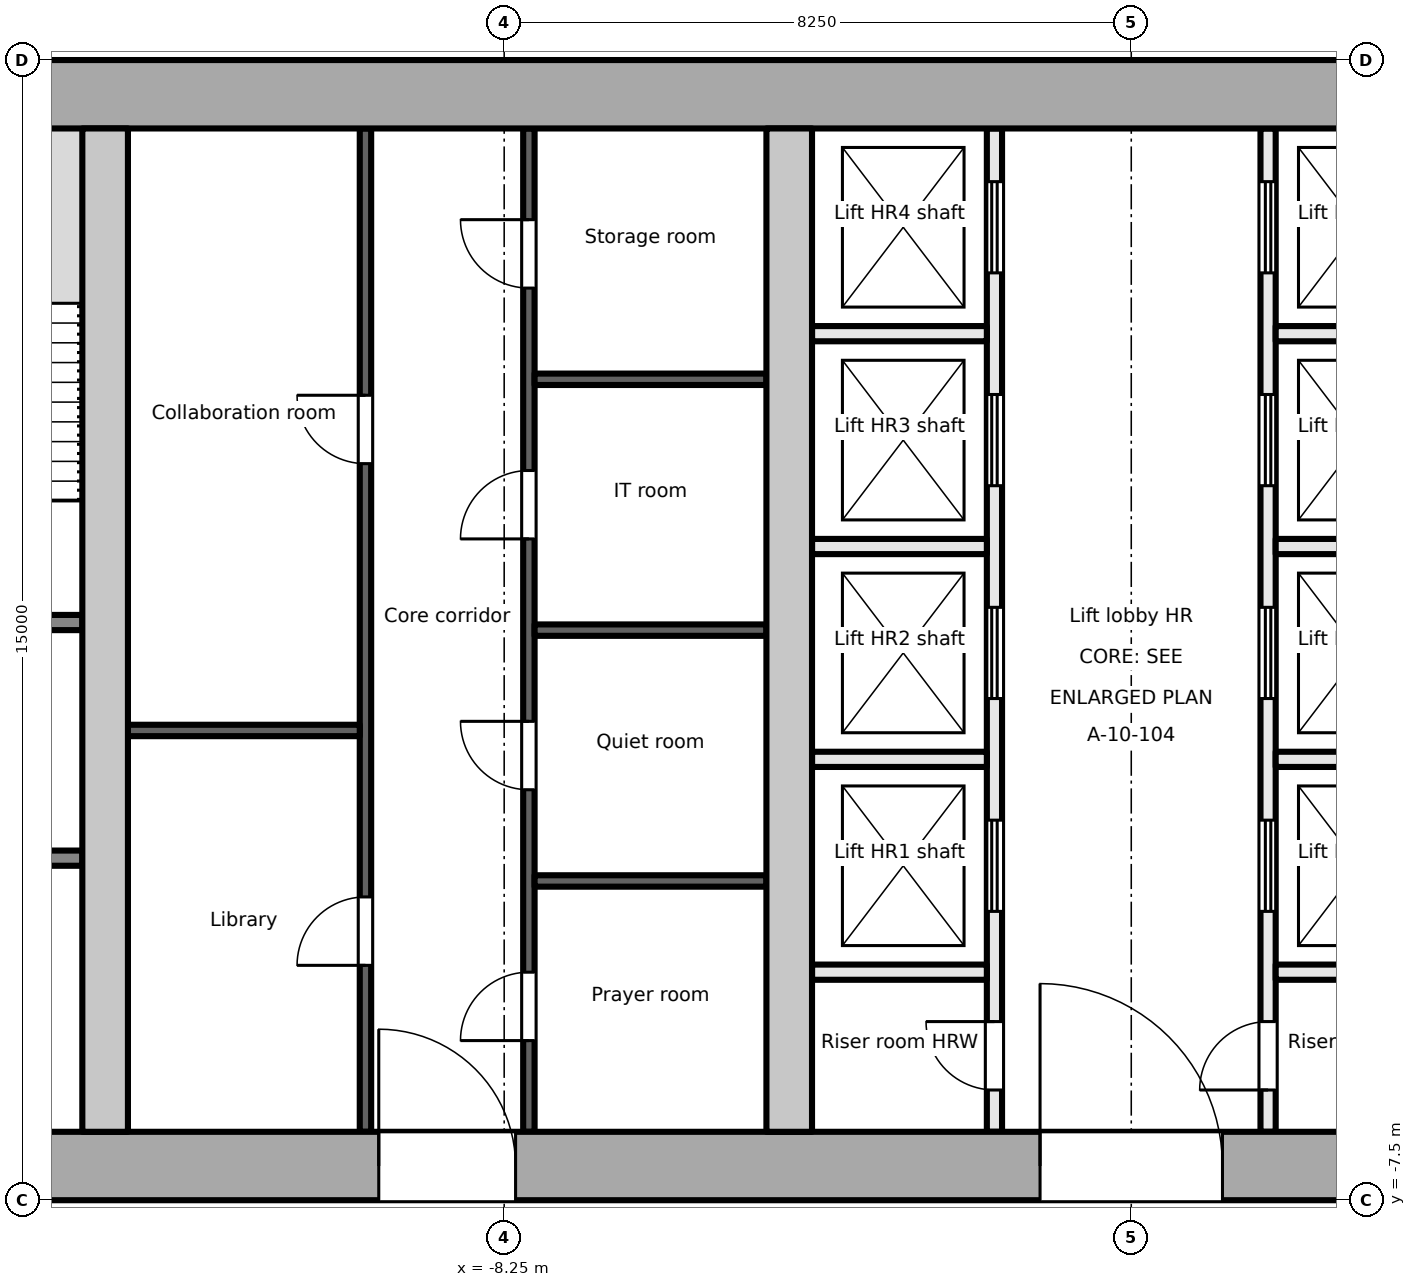
"""IFC4 building model, lengths in metres.
Left out: names, types, materials, properties, quantities, classifications, styles, units other than length and angle.
Written with IfcOpenShell. Run it as: python <this file> out.ifc"""

import sys

from ifc_helpers import new_model, si_unit, direction, frame, frame_2d, origin, place, context, subcontext, project, spatial, rectangle, extrude, element, fill, save


model = new_model("IFC4")
c1 = context("Model", 3, precision=1e-05, world=origin(), true_north=direction((0.0, 1.0)))
c2 = subcontext(c1, "Body", "Model", "MODEL_VIEW")
j1 = project(units=[si_unit("LENGTHUNIT", "METRE"), si_unit("PLANEANGLEUNIT", "RADIAN")], contexts=[c1])
p1 = place(None, origin())
s1 = spatial("IfcSite", under=j1, at=p1, CompositionType="ELEMENT")
p2 = place(p1, origin())
s2 = spatial("IfcBuilding", under=s1, at=p2, CompositionType="ELEMENT")
p3 = place(p2, frame((0.0, 0.0, 195.8)))
s3 = spatial("IfcBuildingStorey", under=s2, at=p3, CompositionType="ELEMENT", Elevation=195.8)
p4 = place(p3, frame((-18.0, -7.05, -0.2), z_axis=(0.0, 0.0, 1.0), x_axis=(1.0, 0.0, 0.0)))
e1 = element("IfcWall", 1, at=p4, inside=s3, PredefinedType="SHEAR", context=c2, shape_type="SweptSolid", body=[
    extrude(rectangle(XDim=36.0, YDim=0.9, at=frame_2d((18.0, 0.0))), origin(), (0.0, 0.0, 1.0), 3.9),
])
p5 = place(p4, frame((8.1, 0.0, 0.2)))
e2 = element("IfcOpeningElement", 2, at=p5, cuts=e1, PredefinedType="OPENING", context=c2, shape_type="SweptSolid", body=[
    extrude(rectangle(XDim=1.8, YDim=2.1, at=frame_2d((0.9, 1.05))), frame((0.0, 0.46, 0.0), z_axis=(0.0, -1.0, 0.0), x_axis=(1.0, 0.0, 0.0)), (0.0, 0.0, 1.0), 0.921),
])
p6 = place(p4, frame((16.8, 0.0, 0.2)))
e3 = element("IfcOpeningElement", 3, at=p6, cuts=e1, PredefinedType="OPENING", context=c2, shape_type="SweptSolid", body=[
    extrude(rectangle(XDim=2.4, YDim=2.1, at=frame_2d((1.2, 1.05))), frame((0.0, 0.46, 0.0), z_axis=(0.0, -1.0, 0.0), x_axis=(1.0, 0.0, 0.0)), (0.0, 0.0, 1.0), 0.921),
])
p7 = place(p4, frame((26.1, 0.0, 0.2)))
e4 = element("IfcOpeningElement", 4, at=p7, cuts=e1, PredefinedType="OPENING", context=c2, shape_type="SweptSolid", body=[
    extrude(rectangle(XDim=2.4, YDim=2.1, at=frame_2d((1.2, 1.05))), frame((0.0, 0.46, 0.0), z_axis=(0.0, -1.0, 0.0), x_axis=(1.0, 0.0, 0.0)), (0.0, 0.0, 1.0), 0.921),
])
p8 = place(p3, frame((-18.0, 7.05, -0.2), z_axis=(0.0, 0.0, 1.0), x_axis=(1.0, 0.0, 0.0)))
e5 = element("IfcWall", 5, at=p8, inside=s3, PredefinedType="SHEAR", context=c2, shape_type="SweptSolid", body=[
    extrude(rectangle(XDim=36.0, YDim=0.9, at=frame_2d((18.0, 0.0))), origin(), (0.0, 0.0, 1.0), 3.9),
])
for number, where, z_axis, x_axis in (
    (6, (-13.5, -6.6, -0.2), (0.0, 0.0, 1.0), (0.0, 1.0, 0.0)),
    (7, (-4.5, -6.6, -0.2), (0.0, 0.0, 1.0), (0.0, 1.0, 0.0)),
):
    element("IfcWall", number, at=place(p3, frame(where, z_axis=z_axis, x_axis=x_axis)), inside=s3, PredefinedType="SHEAR", context=c2, shape_type="SweptSolid", body=[
        extrude(rectangle(XDim=13.2, YDim=0.6, at=frame_2d((6.6, 0.0))), origin(), (0.0, 0.0, 1.0), 3.9),
    ])
p9 = place(p3, frame((-17.1, -3.0, 0.0), z_axis=(0.0, 0.0, 1.0), x_axis=(1.0, 0.0, 0.0)))
e8 = element("IfcWall", 8, at=p9, inside=s3, PredefinedType="PARTITIONING", context=c2, shape_type="SweptSolid", body=[
    extrude(rectangle(XDim=3.3, YDim=0.2, at=frame_2d((1.65, 0.0))), origin(), (0.0, 0.0, 1.0), 3.7),
])
p10 = place(p9, frame((1.1, 0.0, 0.0)))
e9 = element("IfcOpeningElement", 9, at=p10, cuts=e8, PredefinedType="OPENING", context=c2, shape_type="SweptSolid", body=[
    extrude(rectangle(XDim=1.1, YDim=2.1, at=frame_2d((0.55, 1.05))), frame((0.0, 0.111, 0.0), z_axis=(0.0, -1.0, 0.0), x_axis=(1.0, 0.0, 0.0)), (0.0, 0.0, 1.0), 0.221),
])
p11 = place(p3, frame((-17.1, 0.1, 0.0), z_axis=(0.0, 0.0, 1.0), x_axis=(1.0, 0.0, 0.0)))
e10 = element("IfcWall", 10, at=p11, inside=s3, PredefinedType="PARTITIONING", context=c2, shape_type="SweptSolid", body=[
    extrude(rectangle(XDim=3.3, YDim=0.2, at=frame_2d((1.65, 0.0))), origin(), (0.0, 0.0, 1.0), 3.7),
])
p12 = place(p11, frame((1.1, 0.0, 0.0)))
e11 = element("IfcOpeningElement", 11, at=p12, cuts=e10, PredefinedType="OPENING", context=c2, shape_type="SweptSolid", body=[
    extrude(rectangle(XDim=1.1, YDim=2.1, at=frame_2d((0.55, 1.05))), frame((0.0, 0.111, 0.0), z_axis=(0.0, -1.0, 0.0), x_axis=(1.0, 0.0, 0.0)), (0.0, 0.0, 1.0), 0.221),
])
p13 = place(p3, frame((-10.075, -6.6, 0.0), z_axis=(0.0, 0.0, 1.0), x_axis=(0.0, 1.0, 0.0)))
e12 = element("IfcWall", 12, at=p13, inside=s3, PredefinedType="PARTITIONING", context=c2, shape_type="SweptSolid", body=[
    extrude(rectangle(XDim=13.2, YDim=0.15, at=frame_2d((6.6, 0.0))), origin(), (0.0, 0.0, 1.0), 3.7),
])
p14 = place(p13, frame((2.19, 0.0, 0.0)))
e13 = element("IfcOpeningElement", 13, at=p14, cuts=e12, PredefinedType="OPENING", context=c2, shape_type="SweptSolid", body=[
    extrude(rectangle(XDim=0.9, YDim=2.1, at=frame_2d((0.45, 1.05))), frame((0.0, 0.085, 0.0), z_axis=(0.0, -1.0, 0.0), x_axis=(1.0, 0.0, 0.0)), (0.0, 0.0, 1.0), 0.171),
])
p15 = place(p13, frame((8.79, 0.0, 0.0)))
e14 = element("IfcOpeningElement", 14, at=p15, cuts=e12, PredefinedType="OPENING", context=c2, shape_type="SweptSolid", body=[
    extrude(rectangle(XDim=0.9, YDim=2.1, at=frame_2d((0.45, 1.05))), frame((0.0, 0.085, 0.0), z_axis=(0.0, -1.0, 0.0), x_axis=(1.0, 0.0, 0.0)), (0.0, 0.0, 1.0), 0.171),
])
p16 = place(p3, frame((-13.2, -1.32, 0.0), z_axis=(0.0, 0.0, 1.0), x_axis=(1.0, 0.0, 0.0)))
e15 = element("IfcWall", 15, at=p16, inside=s3, PredefinedType="PARTITIONING", context=c2, shape_type="SweptSolid", body=[
    extrude(rectangle(XDim=3.05, YDim=0.15, at=frame_2d((1.525, 0.0))), origin(), (0.0, 0.0, 1.0), 3.7),
])
p17 = place(p3, frame((-7.925, -6.6, 0.0), z_axis=(0.0, 0.0, 1.0), x_axis=(0.0, 1.0, 0.0)))
e16 = element("IfcWall", 16, at=p17, inside=s3, PredefinedType="PARTITIONING", context=c2, shape_type="SweptSolid", body=[
    extrude(rectangle(XDim=13.2, YDim=0.15, at=frame_2d((6.6, 0.0))), origin(), (0.0, 0.0, 1.0), 3.7),
])
p18 = place(p17, frame((1.2, 0.0, 0.0)))
e17 = element("IfcOpeningElement", 17, at=p18, cuts=e16, PredefinedType="OPENING", context=c2, shape_type="SweptSolid", body=[
    extrude(rectangle(XDim=0.9, YDim=2.1, at=frame_2d((0.45, 1.05))), frame((0.0, 0.085, 0.0), z_axis=(0.0, -1.0, 0.0), x_axis=(1.0, 0.0, 0.0)), (0.0, 0.0, 1.0), 0.171),
])
p19 = place(p17, frame((4.5, 0.0, 0.0)))
e18 = element("IfcOpeningElement", 18, at=p19, cuts=e16, PredefinedType="OPENING", context=c2, shape_type="SweptSolid", body=[
    extrude(rectangle(XDim=0.9, YDim=2.1, at=frame_2d((0.45, 1.05))), frame((0.0, 0.085, 0.0), z_axis=(0.0, -1.0, 0.0), x_axis=(1.0, 0.0, 0.0)), (0.0, 0.0, 1.0), 0.171),
])
p20 = place(p17, frame((7.8, 0.0, 0.0)))
e19 = element("IfcOpeningElement", 19, at=p20, cuts=e16, PredefinedType="OPENING", context=c2, shape_type="SweptSolid", body=[
    extrude(rectangle(XDim=0.9, YDim=2.1, at=frame_2d((0.45, 1.05))), frame((0.0, 0.085, 0.0), z_axis=(0.0, -1.0, 0.0), x_axis=(1.0, 0.0, 0.0)), (0.0, 0.0, 1.0), 0.171),
])
p21 = place(p17, frame((11.1, 0.0, 0.0)))
e20 = element("IfcOpeningElement", 20, at=p21, cuts=e16, PredefinedType="OPENING", context=c2, shape_type="SweptSolid", body=[
    extrude(rectangle(XDim=0.9, YDim=2.1, at=frame_2d((0.45, 1.05))), frame((0.0, 0.085, 0.0), z_axis=(0.0, -1.0, 0.0), x_axis=(1.0, 0.0, 0.0)), (0.0, 0.0, 1.0), 0.171),
])
for number, where, z_axis, x_axis in (
    (21, (-7.85, -3.3, 0.0), (0.0, 0.0, 1.0), (1.0, 0.0, 0.0)),
    (22, (-7.85, 0.0, 0.0), (0.0, 0.0, 1.0), (1.0, 0.0, 0.0)),
    (23, (-7.85, 3.3, 0.0), (0.0, 0.0, 1.0), (1.0, 0.0, 0.0)),
):
    element("IfcWall", number, at=place(p3, frame(where, z_axis=z_axis, x_axis=x_axis)), inside=s3, PredefinedType="PARTITIONING", context=c2, shape_type="SweptSolid", body=[
        extrude(rectangle(XDim=3.05, YDim=0.15, at=frame_2d((1.525, 0.0))), origin(), (0.0, 0.0, 1.0), 3.7),
    ])
p22 = place(p3, frame((-1.8, -6.6, 0.0), z_axis=(0.0, 0.0, 1.0), x_axis=(0.0, 1.0, 0.0)))
e24 = element("IfcWall", 24, at=p22, inside=s3, PredefinedType="PARTITIONING", context=c2, shape_type="SweptSolid", body=[
    extrude(rectangle(XDim=13.2, YDim=0.2, at=frame_2d((6.6, 0.0))), origin(), (0.0, 0.0, 1.0), 3.7),
])
p23 = place(p22, frame((0.55, 0.0, 0.0)))
e25 = element("IfcOpeningElement", 25, at=p23, cuts=e24, PredefinedType="OPENING", context=c2, shape_type="SweptSolid", body=[
    extrude(rectangle(XDim=0.9, YDim=2.1, at=frame_2d((0.45, 1.05))), frame((0.0, 0.111, 0.0), z_axis=(0.0, -1.0, 0.0), x_axis=(1.0, 0.0, 0.0)), (0.0, 0.0, 1.0), 0.221),
])
p24 = place(p22, frame((2.9, 0.0, 0.0)))
e26 = element("IfcOpeningElement", 26, at=p24, cuts=e24, PredefinedType="OPENING", context=c2, shape_type="SweptSolid", body=[
    extrude(rectangle(XDim=1.2, YDim=2.1, at=frame_2d((0.6, 1.05))), frame((0.0, 0.111, 0.0), z_axis=(0.0, -1.0, 0.0), x_axis=(1.0, 0.0, 0.0)), (0.0, 0.0, 1.0), 0.221),
])
p25 = place(p22, frame((5.7, 0.0, 0.0)))
e27 = element("IfcOpeningElement", 27, at=p25, cuts=e24, PredefinedType="OPENING", context=c2, shape_type="SweptSolid", body=[
    extrude(rectangle(XDim=1.2, YDim=2.1, at=frame_2d((0.6, 1.05))), frame((0.0, 0.111, 0.0), z_axis=(0.0, -1.0, 0.0), x_axis=(1.0, 0.0, 0.0)), (0.0, 0.0, 1.0), 0.221),
])
p26 = place(p22, frame((8.5, 0.0, 0.0)))
e28 = element("IfcOpeningElement", 28, at=p26, cuts=e24, PredefinedType="OPENING", context=c2, shape_type="SweptSolid", body=[
    extrude(rectangle(XDim=1.2, YDim=2.1, at=frame_2d((0.6, 1.05))), frame((0.0, 0.111, 0.0), z_axis=(0.0, -1.0, 0.0), x_axis=(1.0, 0.0, 0.0)), (0.0, 0.0, 1.0), 0.221),
])
p27 = place(p22, frame((11.3, 0.0, 0.0)))
e29 = element("IfcOpeningElement", 29, at=p27, cuts=e24, PredefinedType="OPENING", context=c2, shape_type="SweptSolid", body=[
    extrude(rectangle(XDim=1.2, YDim=2.1, at=frame_2d((0.6, 1.05))), frame((0.0, 0.111, 0.0), z_axis=(0.0, -1.0, 0.0), x_axis=(1.0, 0.0, 0.0)), (0.0, 0.0, 1.0), 0.221),
])
p28 = place(p3, frame((1.8, -6.6, 0.0), z_axis=(0.0, 0.0, 1.0), x_axis=(0.0, 1.0, 0.0)))
e30 = element("IfcWall", 30, at=p28, inside=s3, PredefinedType="PARTITIONING", context=c2, shape_type="SweptSolid", body=[
    extrude(rectangle(XDim=13.2, YDim=0.2, at=frame_2d((6.6, 0.0))), origin(), (0.0, 0.0, 1.0), 3.7),
])
p29 = place(p28, frame((0.55, 0.0, 0.0)))
e31 = element("IfcOpeningElement", 31, at=p29, cuts=e30, PredefinedType="OPENING", context=c2, shape_type="SweptSolid", body=[
    extrude(rectangle(XDim=0.9, YDim=2.1, at=frame_2d((0.45, 1.05))), frame((0.0, 0.111, 0.0), z_axis=(0.0, -1.0, 0.0), x_axis=(1.0, 0.0, 0.0)), (0.0, 0.0, 1.0), 0.221),
])
p30 = place(p28, frame((2.9, 0.0, 0.0)))
e32 = element("IfcOpeningElement", 32, at=p30, cuts=e30, PredefinedType="OPENING", context=c2, shape_type="SweptSolid", body=[
    extrude(rectangle(XDim=1.2, YDim=2.1, at=frame_2d((0.6, 1.05))), frame((0.0, 0.111, 0.0), z_axis=(0.0, -1.0, 0.0), x_axis=(1.0, 0.0, 0.0)), (0.0, 0.0, 1.0), 0.221),
])
p31 = place(p28, frame((5.7, 0.0, 0.0)))
e33 = element("IfcOpeningElement", 33, at=p31, cuts=e30, PredefinedType="OPENING", context=c2, shape_type="SweptSolid", body=[
    extrude(rectangle(XDim=1.2, YDim=2.1, at=frame_2d((0.6, 1.05))), frame((0.0, 0.111, 0.0), z_axis=(0.0, -1.0, 0.0), x_axis=(1.0, 0.0, 0.0)), (0.0, 0.0, 1.0), 0.221),
])
p32 = place(p28, frame((8.5, 0.0, 0.0)))
e34 = element("IfcOpeningElement", 34, at=p32, cuts=e30, PredefinedType="OPENING", context=c2, shape_type="SweptSolid", body=[
    extrude(rectangle(XDim=1.2, YDim=2.1, at=frame_2d((0.6, 1.05))), frame((0.0, 0.111, 0.0), z_axis=(0.0, -1.0, 0.0), x_axis=(1.0, 0.0, 0.0)), (0.0, 0.0, 1.0), 0.221),
])
p33 = place(p28, frame((11.3, 0.0, 0.0)))
e35 = element("IfcOpeningElement", 35, at=p33, cuts=e30, PredefinedType="OPENING", context=c2, shape_type="SweptSolid", body=[
    extrude(rectangle(XDim=1.2, YDim=2.1, at=frame_2d((0.6, 1.05))), frame((0.0, 0.111, 0.0), z_axis=(0.0, -1.0, 0.0), x_axis=(1.0, 0.0, 0.0)), (0.0, 0.0, 1.0), 0.221),
])
for number, where, z_axis, x_axis in (
    (36, (-4.2, -1.7, 0.0), (0.0, 0.0, 1.0), (1.0, 0.0, 0.0)),
    (37, (-4.2, 1.1, 0.0), (0.0, 0.0, 1.0), (1.0, 0.0, 0.0)),
    (38, (-4.2, 3.9, 0.0), (0.0, 0.0, 1.0), (1.0, 0.0, 0.0)),
    (39, (-4.2, -4.5, 0.0), (0.0, 0.0, 1.0), (1.0, 0.0, 0.0)),
    (40, (1.9, -1.7, 0.0), (0.0, 0.0, 1.0), (1.0, 0.0, 0.0)),
    (41, (1.9, 1.1, 0.0), (0.0, 0.0, 1.0), (1.0, 0.0, 0.0)),
    (42, (1.9, 3.9, 0.0), (0.0, 0.0, 1.0), (1.0, 0.0, 0.0)),
    (43, (1.9, -4.5, 0.0), (0.0, 0.0, 1.0), (1.0, 0.0, 0.0)),
):
    element("IfcWall", number, at=place(p3, frame(where, z_axis=z_axis, x_axis=x_axis)), inside=s3, PredefinedType="PARTITIONING", context=c2, shape_type="SweptSolid", body=[
        extrude(rectangle(XDim=2.3, YDim=0.2, at=frame_2d((1.15, 0.0))), origin(), (0.0, 0.0, 1.0), 3.7),
    ])
p34 = place(p14, origin())
e44 = element("IfcDoor", 44, at=p34, inside=s3, OperationType="SINGLE_SWING_LEFT", PredefinedType="DOOR", context=c2, shape_type="SweptSolid", body=[
    extrude(rectangle(XDim=0.9, YDim=2.1, at=frame_2d((0.45, 1.05))), frame((0.0, 0.025, 0.0), z_axis=(0.0, -1.0, 0.0), x_axis=(1.0, 0.0, 0.0)), (0.0, 0.0, 1.0), 0.05),
])
fill(e13, e44)
p35 = place(p15, origin())
e45 = element("IfcDoor", 45, at=p35, inside=s3, OperationType="SINGLE_SWING_RIGHT", PredefinedType="DOOR", context=c2, shape_type="SweptSolid", body=[
    extrude(rectangle(XDim=0.9, YDim=2.1, at=frame_2d((0.45, 1.05))), frame((0.0, 0.025, 0.0), z_axis=(0.0, -1.0, 0.0), x_axis=(1.0, 0.0, 0.0)), (0.0, 0.0, 1.0), 0.05),
])
fill(e14, e45)
p36 = place(p18, origin())
e46 = element("IfcDoor", 46, at=p36, inside=s3, OperationType="SINGLE_SWING_LEFT", PredefinedType="DOOR", context=c2, shape_type="SweptSolid", body=[
    extrude(rectangle(XDim=0.9, YDim=2.1, at=frame_2d((0.45, 1.05))), frame((0.0, 0.025, 0.0), z_axis=(0.0, -1.0, 0.0), x_axis=(1.0, 0.0, 0.0)), (0.0, 0.0, 1.0), 0.05),
])
fill(e17, e46)
p37 = place(p19, origin())
e47 = element("IfcDoor", 47, at=p37, inside=s3, OperationType="SINGLE_SWING_RIGHT", PredefinedType="DOOR", context=c2, shape_type="SweptSolid", body=[
    extrude(rectangle(XDim=0.9, YDim=2.1, at=frame_2d((0.45, 1.05))), frame((0.0, 0.025, 0.0), z_axis=(0.0, -1.0, 0.0), x_axis=(1.0, 0.0, 0.0)), (0.0, 0.0, 1.0), 0.05),
])
fill(e18, e47)
p38 = place(p20, origin())
e48 = element("IfcDoor", 48, at=p38, inside=s3, OperationType="SINGLE_SWING_LEFT", PredefinedType="DOOR", context=c2, shape_type="SweptSolid", body=[
    extrude(rectangle(XDim=0.9, YDim=2.1, at=frame_2d((0.45, 1.05))), frame((0.0, 0.025, 0.0), z_axis=(0.0, -1.0, 0.0), x_axis=(1.0, 0.0, 0.0)), (0.0, 0.0, 1.0), 0.05),
])
fill(e19, e48)
p39 = place(p21, origin())
e49 = element("IfcDoor", 49, at=p39, inside=s3, OperationType="SINGLE_SWING_RIGHT", PredefinedType="DOOR", context=c2, shape_type="SweptSolid", body=[
    extrude(rectangle(XDim=0.9, YDim=2.1, at=frame_2d((0.45, 1.05))), frame((0.0, 0.025, 0.0), z_axis=(0.0, -1.0, 0.0), x_axis=(1.0, 0.0, 0.0)), (0.0, 0.0, 1.0), 0.05),
])
fill(e20, e49)
p40 = place(p5, origin())
e50 = element("IfcDoor", 50, at=p40, inside=s3, OperationType="SINGLE_SWING_LEFT", PredefinedType="DOOR", context=c2, shape_type="SweptSolid", body=[
    extrude(rectangle(XDim=1.8, YDim=2.1, at=frame_2d((0.9, 1.05))), frame((0.0, 0.025, 0.0), z_axis=(0.0, -1.0, 0.0), x_axis=(1.0, 0.0, 0.0)), (0.0, 0.0, 1.0), 0.05),
])
fill(e2, e50)
p41 = place(p23, origin())
e51 = element("IfcDoor", 51, at=p41, inside=s3, OperationType="SINGLE_SWING_RIGHT", PredefinedType="DOOR", context=c2, shape_type="SweptSolid", body=[
    extrude(rectangle(XDim=0.9, YDim=2.1, at=frame_2d((0.45, 1.05))), frame((0.0, 0.025, 0.0), z_axis=(0.0, -1.0, 0.0), x_axis=(1.0, 0.0, 0.0)), (0.0, 0.0, 1.0), 0.05),
])
fill(e25, e51)
p42 = place(p24, origin())
e52 = element("IfcDoor", 52, at=p42, inside=s3, OperationType="DOUBLE_DOOR_SLIDING", PredefinedType="DOOR", context=c2, shape_type="SweptSolid", body=[
    extrude(rectangle(XDim=1.2, YDim=2.1, at=frame_2d((0.6, 1.05))), frame((0.0, 0.025, 0.0), z_axis=(0.0, -1.0, 0.0), x_axis=(1.0, 0.0, 0.0)), (0.0, 0.0, 1.0), 0.05),
])
fill(e26, e52)
p43 = place(p25, origin())
e53 = element("IfcDoor", 53, at=p43, inside=s3, OperationType="DOUBLE_DOOR_SLIDING", PredefinedType="DOOR", context=c2, shape_type="SweptSolid", body=[
    extrude(rectangle(XDim=1.2, YDim=2.1, at=frame_2d((0.6, 1.05))), frame((0.0, 0.025, 0.0), z_axis=(0.0, -1.0, 0.0), x_axis=(1.0, 0.0, 0.0)), (0.0, 0.0, 1.0), 0.05),
])
fill(e27, e53)
p44 = place(p26, origin())
e54 = element("IfcDoor", 54, at=p44, inside=s3, OperationType="DOUBLE_DOOR_SLIDING", PredefinedType="DOOR", context=c2, shape_type="SweptSolid", body=[
    extrude(rectangle(XDim=1.2, YDim=2.1, at=frame_2d((0.6, 1.05))), frame((0.0, 0.025, 0.0), z_axis=(0.0, -1.0, 0.0), x_axis=(1.0, 0.0, 0.0)), (0.0, 0.0, 1.0), 0.05),
])
fill(e28, e54)
p45 = place(p27, origin())
e55 = element("IfcDoor", 55, at=p45, inside=s3, OperationType="DOUBLE_DOOR_SLIDING", PredefinedType="DOOR", context=c2, shape_type="SweptSolid", body=[
    extrude(rectangle(XDim=1.2, YDim=2.1, at=frame_2d((0.6, 1.05))), frame((0.0, 0.025, 0.0), z_axis=(0.0, -1.0, 0.0), x_axis=(1.0, 0.0, 0.0)), (0.0, 0.0, 1.0), 0.05),
])
fill(e29, e55)
p46 = place(p29, origin())
e56 = element("IfcDoor", 56, at=p46, inside=s3, OperationType="SINGLE_SWING_LEFT", PredefinedType="DOOR", context=c2, shape_type="SweptSolid", body=[
    extrude(rectangle(XDim=0.9, YDim=2.1, at=frame_2d((0.45, 1.05))), frame((0.0, 0.025, 0.0), z_axis=(0.0, -1.0, 0.0), x_axis=(1.0, 0.0, 0.0)), (0.0, 0.0, 1.0), 0.05),
])
fill(e31, e56)
p47 = place(p30, origin())
e57 = element("IfcDoor", 57, at=p47, inside=s3, OperationType="DOUBLE_DOOR_SLIDING", PredefinedType="DOOR", context=c2, shape_type="SweptSolid", body=[
    extrude(rectangle(XDim=1.2, YDim=2.1, at=frame_2d((0.6, 1.05))), frame((0.0, 0.025, 0.0), z_axis=(0.0, -1.0, 0.0), x_axis=(1.0, 0.0, 0.0)), (0.0, 0.0, 1.0), 0.05),
])
fill(e32, e57)
p48 = place(p31, origin())
e58 = element("IfcDoor", 58, at=p48, inside=s3, OperationType="DOUBLE_DOOR_SLIDING", PredefinedType="DOOR", context=c2, shape_type="SweptSolid", body=[
    extrude(rectangle(XDim=1.2, YDim=2.1, at=frame_2d((0.6, 1.05))), frame((0.0, 0.025, 0.0), z_axis=(0.0, -1.0, 0.0), x_axis=(1.0, 0.0, 0.0)), (0.0, 0.0, 1.0), 0.05),
])
fill(e33, e58)
p49 = place(p32, origin())
e59 = element("IfcDoor", 59, at=p49, inside=s3, OperationType="DOUBLE_DOOR_SLIDING", PredefinedType="DOOR", context=c2, shape_type="SweptSolid", body=[
    extrude(rectangle(XDim=1.2, YDim=2.1, at=frame_2d((0.6, 1.05))), frame((0.0, 0.025, 0.0), z_axis=(0.0, -1.0, 0.0), x_axis=(1.0, 0.0, 0.0)), (0.0, 0.0, 1.0), 0.05),
])
fill(e34, e59)
p50 = place(p33, origin())
e60 = element("IfcDoor", 60, at=p50, inside=s3, OperationType="DOUBLE_DOOR_SLIDING", PredefinedType="DOOR", context=c2, shape_type="SweptSolid", body=[
    extrude(rectangle(XDim=1.2, YDim=2.1, at=frame_2d((0.6, 1.05))), frame((0.0, 0.025, 0.0), z_axis=(0.0, -1.0, 0.0), x_axis=(1.0, 0.0, 0.0)), (0.0, 0.0, 1.0), 0.05),
])
fill(e35, e60)
p51 = place(p6, origin())
e61 = element("IfcDoor", 61, at=p51, inside=s3, OperationType="DOUBLE_DOOR_DOUBLE_SWING", PredefinedType="DOOR", context=c2, shape_type="SweptSolid", body=[
    extrude(rectangle(XDim=2.4, YDim=2.1, at=frame_2d((1.2, 1.05))), frame((0.0, 0.025, 0.0), z_axis=(0.0, -1.0, 0.0), x_axis=(1.0, 0.0, 0.0)), (0.0, 0.0, 1.0), 0.05),
])
fill(e3, e61)
save(model, sys.argv[1])
